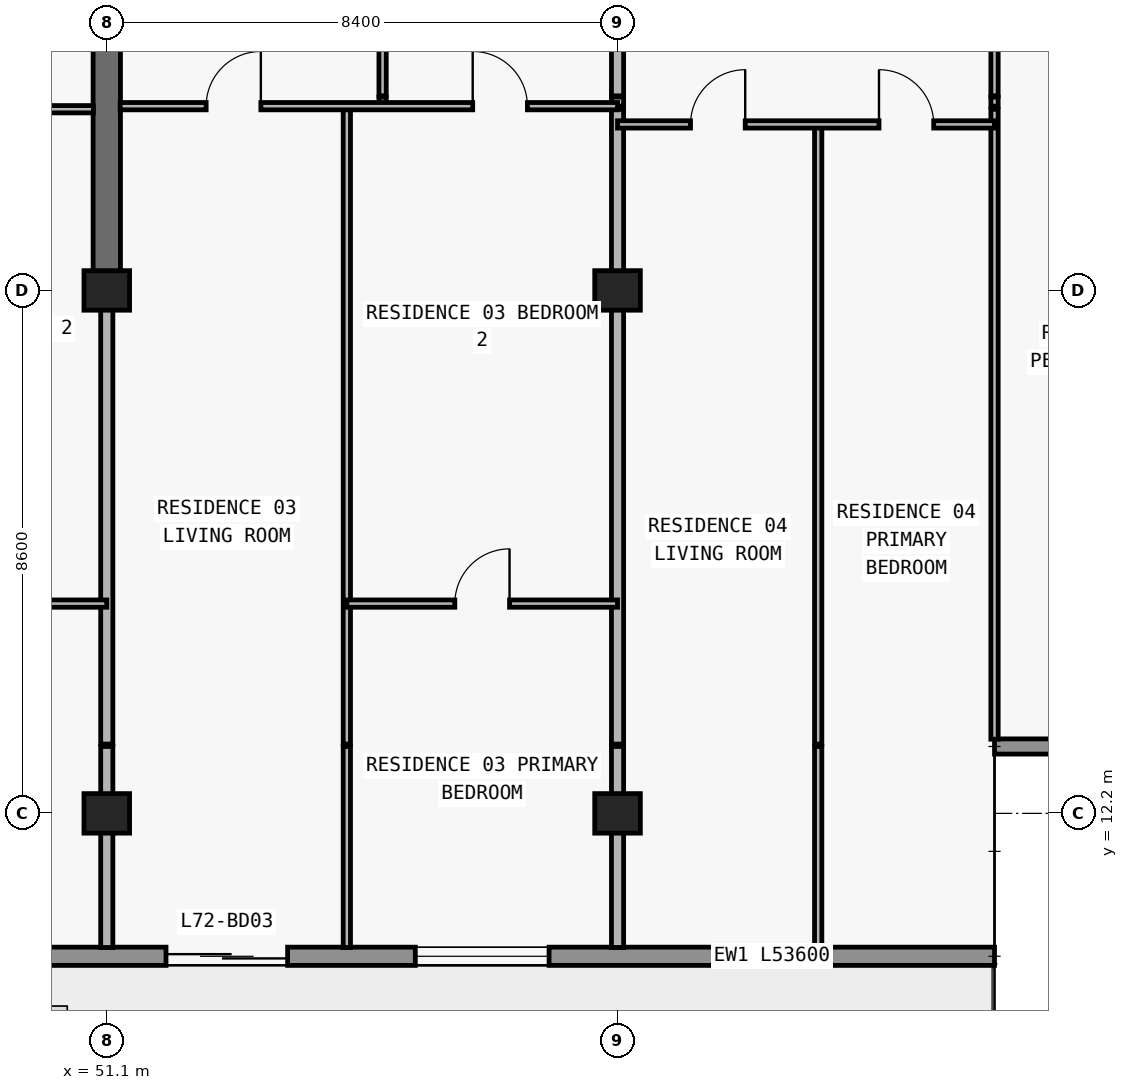
"""IFC4 building model, lengths in metres.
Left out: names, types, materials, properties, quantities, classifications, styles, units other than length and angle.
Written with IfcOpenShell. Run it as: python <this file> out.ifc"""

import sys

from ifc_helpers import new_model, si_unit, direction, frame, frame_2d, origin, origin_2d, place, context, subcontext, project, spatial, rectangle, extrude, element, fill, save


model = new_model("IFC4")
c1 = context("Model", 3, precision=1e-05, world=origin(), true_north=direction((0.0, 1.0)))
c2 = subcontext(c1, "Body", "Model", "MODEL_VIEW")
j1 = project(units=[si_unit("LENGTHUNIT", "METRE"), si_unit("PLANEANGLEUNIT", "RADIAN")], contexts=[c1])
p1 = place(None, origin())
s1 = spatial("IfcSite", under=j1, at=p1, CompositionType="ELEMENT")
p2 = place(p1, origin())
s2 = spatial("IfcBuilding", under=s1, at=p2, CompositionType="ELEMENT")
p3 = place(p2, frame((0.0, 0.0, 256.2)))
s3 = spatial("IfcBuildingStorey", under=s2, at=p3, CompositionType="ELEMENT", Elevation=256.2)
for number, where, z_axis, x_axis in (
    (1, (51.1, 12.2, 0.0), (0.0, 0.0, 1.0), (1.0, 0.0, 0.0)),
    (2, (59.5, 12.2, 0.0), (0.0, 0.0, 1.0), (1.0, 0.0, 0.0)),
    (3, (51.1, 20.8, 0.0), (0.0, 0.0, 1.0), (1.0, 0.0, 0.0)),
    (4, (59.5, 20.8, 0.0), (0.0, 0.0, 1.0), (1.0, 0.0, 0.0)),
):
    element("IfcColumn", number, at=place(p3, frame(where, z_axis=z_axis, x_axis=x_axis)), inside=s3, PredefinedType="COLUMN", context=c2, shape_type="SweptSolid", body=[
        extrude(rectangle(XDim=0.75, YDim=0.65, at=origin_2d()), origin(), (0.0, 0.0, 1.0), 3.05),
    ])
p4 = place(p3, frame((51.1, 20.8, 0.0), z_axis=(0.0, 0.0, 1.0), x_axis=(0.0, 1.0, 0.0)))
e5 = element("IfcWall", 5, at=p4, inside=s3, PredefinedType="SHEAR", context=c2, shape_type="SweptSolid", body=[
    extrude(rectangle(XDim=8.6, YDim=0.45, at=frame_2d((4.3, 0.0))), origin(), (0.0, 0.0, 1.0), 3.05),
])
p5 = place(p3, frame((65.7, 9.85, 0.0), z_axis=(0.0, 0.0, 1.0), x_axis=(-1.0, 0.0, 0.0)))
e6 = element("IfcWall", 6, at=p5, inside=s3, PredefinedType="STANDARD", context=c2, shape_type="SweptSolid", body=[
    extrude(rectangle(XDim=53.6, YDim=0.3, at=frame_2d((26.8, 0.0))), origin(), (0.0, 0.0, 1.0), 3.05),
])
p6 = place(p5, frame((49.5, 0.0, 0.0)))
e7 = element("IfcOpeningElement", 7, at=p6, cuts=e6, PredefinedType="OPENING", context=c2, shape_type="SweptSolid", body=[
    extrude(rectangle(XDim=2.0, YDim=2.3, at=frame_2d((1.0, 1.15))), frame((0.0, 0.16, 0.0), z_axis=(0.0, -1.0, 0.0), x_axis=(1.0, 0.0, 0.0)), (0.0, 0.0, 1.0), 0.32),
])
p7 = place(p5, frame((42.1, 0.0, 0.85)))
e8 = element("IfcOpeningElement", 8, at=p7, cuts=e6, PredefinedType="OPENING", context=c2, shape_type="SweptSolid", body=[
    extrude(rectangle(XDim=2.2, YDim=1.55, at=frame_2d((1.1, 0.775))), frame((0.0, 0.16, 0.0), z_axis=(0.0, -1.0, 0.0), x_axis=(1.0, 0.0, 0.0)), (0.0, 0.0, 1.0), 0.32),
])
p8 = place(p5, frame((36.09, 0.0, 0.0)))
e9 = element("IfcOpeningElement", 9, at=p8, cuts=e6, PredefinedType="OPENING", context=c2, shape_type="SweptSolid", body=[
    extrude(rectangle(XDim=2.0, YDim=2.3, at=frame_2d((1.0, 1.15))), frame((0.0, 0.16, 0.0), z_axis=(0.0, -1.0, 0.0), x_axis=(1.0, 0.0, 0.0)), (0.0, 0.0, 1.0), 0.32),
])
p9 = place(p5, frame((31.41, 0.0, 0.65)))
e10 = element("IfcOpeningElement", 10, at=p9, cuts=e6, PredefinedType="OPENING", context=c2, shape_type="SweptSolid", body=[
    extrude(rectangle(XDim=2.6, YDim=1.85, at=frame_2d((1.3, 0.925))), frame((0.0, 0.16, 0.0), z_axis=(0.0, -1.0, 0.0), x_axis=(1.0, 0.0, 0.0)), (0.0, 0.0, 1.0), 0.32),
])
p10 = place(p5, frame((25.7, 0.0, 0.85)))
e11 = element("IfcOpeningElement", 11, at=p10, cuts=e6, PredefinedType="OPENING", context=c2, shape_type="SweptSolid", body=[
    extrude(rectangle(XDim=2.2, YDim=1.55, at=frame_2d((1.1, 0.775))), frame((0.0, 0.16, 0.0), z_axis=(0.0, -1.0, 0.0), x_axis=(1.0, 0.0, 0.0)), (0.0, 0.0, 1.0), 0.32),
])
p11 = place(p5, frame((17.7, 0.0, 0.85)))
e12 = element("IfcOpeningElement", 12, at=p11, cuts=e6, PredefinedType="OPENING", context=c2, shape_type="SweptSolid", body=[
    extrude(rectangle(XDim=2.2, YDim=1.55, at=frame_2d((1.1, 0.775))), frame((0.0, 0.16, 0.0), z_axis=(0.0, -1.0, 0.0), x_axis=(1.0, 0.0, 0.0)), (0.0, 0.0, 1.0), 0.32),
])
p12 = place(p5, frame((11.626, 0.0, 0.0)))
e13 = element("IfcOpeningElement", 13, at=p12, cuts=e6, PredefinedType="OPENING", context=c2, shape_type="SweptSolid", body=[
    extrude(rectangle(XDim=2.0, YDim=2.3, at=frame_2d((1.0, 1.15))), frame((0.0, 0.16, 0.0), z_axis=(0.0, -1.0, 0.0), x_axis=(1.0, 0.0, 0.0)), (0.0, 0.0, 1.0), 0.32),
])
p13 = place(p5, frame((7.326, 0.0, 0.85)))
e14 = element("IfcOpeningElement", 14, at=p13, cuts=e6, PredefinedType="OPENING", context=c2, shape_type="SweptSolid", body=[
    extrude(rectangle(XDim=2.2, YDim=1.55, at=frame_2d((1.1, 0.775))), frame((0.0, 0.16, 0.0), z_axis=(0.0, -1.0, 0.0), x_axis=(1.0, 0.0, 0.0)), (0.0, 0.0, 1.0), 0.32),
])
p14 = place(p3, frame((65.7, 13.3, 0.0), z_axis=(0.0, 0.0, 1.0), x_axis=(1.0, 0.0, 0.0)))
e15 = element("IfcWall", 15, at=p14, inside=s3, PredefinedType="ELEMENTEDWALL", context=c2, shape_type="SweptSolid", body=[
    extrude(rectangle(XDim=3.85, YDim=0.25, at=frame_2d((1.925, 0.0))), origin(), (0.0, 0.0, 1.0), 3.05),
])
p15 = place(p3, frame((51.1, 9.995, 0.0), z_axis=(0.0, 0.0, 1.0), x_axis=(0.0, 1.0, 0.0)))
e16 = element("IfcWall", 16, at=p15, inside=s3, PredefinedType="PARTITIONING", context=c2, shape_type="SweptSolid", body=[
    extrude(rectangle(XDim=3.305, YDim=0.2, at=frame_2d((1.652, 0.0))), origin(), (0.0, 0.0, 1.0), 2.263),
])
p16 = place(p3, frame((51.1, 13.34, 0.0), z_axis=(0.0, 0.0, 1.0), x_axis=(0.0, 1.0, 0.0)))
e17 = element("IfcWall", 17, at=p16, inside=s3, PredefinedType="PARTITIONING", context=c2, shape_type="SweptSolid", body=[
    extrude(rectangle(XDim=7.455, YDim=0.2, at=frame_2d((3.728, 0.0))), origin(), (0.0, 0.0, 1.0), 2.263),
])
p17 = place(p3, frame((55.048, 9.995, 0.0), z_axis=(0.0, 0.0, 1.0), x_axis=(0.0, 1.0, 0.0)))
e18 = element("IfcWall", 18, at=p17, inside=s3, PredefinedType="PARTITIONING", context=c2, shape_type="SweptSolid", body=[
    extrude(rectangle(XDim=3.305, YDim=0.12, at=frame_2d((1.652, 0.0))), origin(), (0.0, 0.0, 1.0), 3.05),
])
p18 = place(p3, frame((55.048, 13.34, 0.0), z_axis=(0.0, 0.0, 1.0), x_axis=(0.0, 1.0, 0.0)))
e19 = element("IfcWall", 19, at=p18, inside=s3, PredefinedType="PARTITIONING", context=c2, shape_type="SweptSolid", body=[
    extrude(rectangle(XDim=10.44, YDim=0.12, at=frame_2d((5.22, 0.0))), origin(), (0.0, 0.0, 1.0), 3.05),
])
p19 = place(p3, frame((55.636, 23.83, 0.0), z_axis=(0.0, 0.0, 1.0), x_axis=(0.0, 1.0, 0.0)))
e20 = element("IfcWall", 20, at=p19, inside=s3, PredefinedType="PARTITIONING", context=c2, shape_type="SweptSolid", body=[
    extrude(rectangle(XDim=0.15, YDim=0.12, at=frame_2d((0.075, 0.0))), origin(), (0.0, 0.0, 1.0), 3.05),
])
p20 = place(p3, frame((55.636, 24.0, 0.0), z_axis=(0.0, 0.0, 1.0), x_axis=(0.0, 1.0, 0.0)))
e21 = element("IfcWall", 21, at=p20, inside=s3, PredefinedType="PARTITIONING", context=c2, shape_type="SweptSolid", body=[
    extrude(rectangle(XDim=4.58, YDim=0.12, at=frame_2d((2.29, 0.0))), origin(), (0.0, 0.0, 1.0), 3.05),
])
p21 = place(p20, frame((1.84, 0.0, 0.0)))
e22 = element("IfcOpeningElement", 22, at=p21, cuts=e21, PredefinedType="OPENING", context=c2, shape_type="SweptSolid", body=[
    extrude(rectangle(XDim=0.9, YDim=2.15, at=frame_2d((0.45, 1.075))), frame((0.0, 0.07, 0.0), z_axis=(0.0, -1.0, 0.0), x_axis=(1.0, 0.0, 0.0)), (0.0, 0.0, 1.0), 0.14),
])
p22 = place(p3, frame((59.5, 9.995, 0.0), z_axis=(0.0, 0.0, 1.0), x_axis=(0.0, 1.0, 0.0)))
e23 = element("IfcWall", 23, at=p22, inside=s3, PredefinedType="PARTITIONING", context=c2, shape_type="SweptSolid", body=[
    extrude(rectangle(XDim=3.305, YDim=0.2, at=frame_2d((1.652, 0.0))), origin(), (0.0, 0.0, 1.0), 2.263),
])
p23 = place(p3, frame((59.5, 13.34, 0.0), z_axis=(0.0, 0.0, 1.0), x_axis=(0.0, 1.0, 0.0)))
e24 = element("IfcWall", 24, at=p23, inside=s3, PredefinedType="PARTITIONING", context=c2, shape_type="SweptSolid", body=[
    extrude(rectangle(XDim=10.44, YDim=0.2, at=frame_2d((5.22, 0.0))), origin(), (0.0, 0.0, 1.0), 2.263),
])
p24 = place(p3, frame((59.5, 23.83, 0.0), z_axis=(0.0, 0.0, 1.0), x_axis=(0.0, 1.0, 0.0)))
e25 = element("IfcWall", 25, at=p24, inside=s3, PredefinedType="PARTITIONING", context=c2, shape_type="SweptSolid", body=[
    extrude(rectangle(XDim=0.15, YDim=0.2, at=frame_2d((0.075, 0.0))), origin(), (0.0, 0.0, 1.0), 2.263),
])
p25 = place(p3, frame((59.5, 24.0, 0.0), z_axis=(0.0, 0.0, 1.0), x_axis=(0.0, 1.0, 0.0)))
e26 = element("IfcWall", 26, at=p25, inside=s3, PredefinedType="PARTITIONING", context=c2, shape_type="SweptSolid", body=[
    extrude(rectangle(XDim=4.58, YDim=0.2, at=frame_2d((2.29, 0.0))), origin(), (0.0, 0.0, 1.0), 2.263),
])
p26 = place(p3, frame((62.8, 9.995, 0.0), z_axis=(0.0, 0.0, 1.0), x_axis=(0.0, 1.0, 0.0)))
e27 = element("IfcWall", 27, at=p26, inside=s3, PredefinedType="PARTITIONING", context=c2, shape_type="SweptSolid", body=[
    extrude(rectangle(XDim=3.305, YDim=0.12, at=frame_2d((1.652, 0.0))), origin(), (0.0, 0.0, 1.0), 3.05),
])
p27 = place(p3, frame((62.8, 13.34, 0.0), z_axis=(0.0, 0.0, 1.0), x_axis=(0.0, 1.0, 0.0)))
e28 = element("IfcWall", 28, at=p27, inside=s3, PredefinedType="PARTITIONING", context=c2, shape_type="SweptSolid", body=[
    extrude(rectangle(XDim=10.19, YDim=0.12, at=frame_2d((5.095, 0.0))), origin(), (0.0, 0.0, 1.0), 3.05),
])
p28 = place(p3, frame((65.7, 13.42, 0.0), z_axis=(0.0, 0.0, 1.0), x_axis=(0.0, 1.0, 0.0)))
e29 = element("IfcWall", 29, at=p28, inside=s3, PredefinedType="PARTITIONING", context=c2, shape_type="SweptSolid", body=[
    extrude(rectangle(XDim=10.36, YDim=0.12, at=frame_2d((5.18, 0.0))), origin(), (0.0, 0.0, 1.0), 3.05),
])
p29 = place(p3, frame((65.7, 23.83, 0.0), z_axis=(0.0, 0.0, 1.0), x_axis=(0.0, 1.0, 0.0)))
e30 = element("IfcWall", 30, at=p29, inside=s3, PredefinedType="PARTITIONING", context=c2, shape_type="SweptSolid", body=[
    extrude(rectangle(XDim=0.15, YDim=0.12, at=frame_2d((0.075, 0.0))), origin(), (0.0, 0.0, 1.0), 3.05),
])
p30 = place(p3, frame((65.7, 24.0, 0.0), z_axis=(0.0, 0.0, 1.0), x_axis=(0.0, 1.0, 0.0)))
e31 = element("IfcWall", 31, at=p30, inside=s3, PredefinedType="PARTITIONING", context=c2, shape_type="SweptSolid", body=[
    extrude(rectangle(XDim=4.58, YDim=0.12, at=frame_2d((2.29, 0.0))), origin(), (0.0, 0.0, 1.0), 3.05),
])
p31 = place(p30, frame((1.84, 0.0, 0.0)))
e32 = element("IfcOpeningElement", 32, at=p31, cuts=e31, PredefinedType="OPENING", context=c2, shape_type="SweptSolid", body=[
    extrude(rectangle(XDim=0.9, YDim=2.15, at=frame_2d((0.45, 1.075))), frame((0.0, 0.07, 0.0), z_axis=(0.0, -1.0, 0.0), x_axis=(1.0, 0.0, 0.0)), (0.0, 0.0, 1.0), 0.14),
])
p32 = place(p3, frame((35.1, 15.65, 0.0), z_axis=(0.0, 0.0, 1.0), x_axis=(1.0, 0.0, 0.0)))
e33 = element("IfcWall", 33, at=p32, inside=s3, PredefinedType="PARTITIONING", context=c2, shape_type="SweptSolid", body=[
    extrude(rectangle(XDim=16.0, YDim=0.12, at=frame_2d((8.0, 0.0))), origin(), (0.0, 0.0, 1.0), 3.05),
])
p33 = place(p32, frame((3.35, 0.0, 0.0)))
e34 = element("IfcOpeningElement", 34, at=p33, cuts=e33, PredefinedType="OPENING", context=c2, shape_type="SweptSolid", body=[
    extrude(rectangle(XDim=0.9, YDim=2.15, at=frame_2d((0.45, 1.075))), frame((0.0, 0.07, 0.0), z_axis=(0.0, -1.0, 0.0), x_axis=(1.0, 0.0, 0.0)), (0.0, 0.0, 1.0), 0.14),
])
p34 = place(p32, frame((11.35, 0.0, 0.0)))
e35 = element("IfcOpeningElement", 35, at=p34, cuts=e33, PredefinedType="OPENING", context=c2, shape_type="SweptSolid", body=[
    extrude(rectangle(XDim=0.9, YDim=2.15, at=frame_2d((0.45, 1.075))), frame((0.0, 0.07, 0.0), z_axis=(0.0, -1.0, 0.0), x_axis=(1.0, 0.0, 0.0)), (0.0, 0.0, 1.0), 0.14),
])
p35 = place(p3, frame((55.048, 15.65, 0.0), z_axis=(0.0, 0.0, 1.0), x_axis=(1.0, 0.0, 0.0)))
e36 = element("IfcWall", 36, at=p35, inside=s3, PredefinedType="PARTITIONING", context=c2, shape_type="SweptSolid", body=[
    extrude(rectangle(XDim=4.452, YDim=0.12, at=frame_2d((2.226, 0.0))), origin(), (0.0, 0.0, 1.0), 3.05),
])
p36 = place(p35, frame((1.776, 0.0, 0.0)))
e37 = element("IfcOpeningElement", 37, at=p36, cuts=e36, PredefinedType="OPENING", context=c2, shape_type="SweptSolid", body=[
    extrude(rectangle(XDim=0.9, YDim=2.15, at=frame_2d((0.45, 1.075))), frame((0.0, 0.07, 0.0), z_axis=(0.0, -1.0, 0.0), x_axis=(1.0, 0.0, 0.0)), (0.0, 0.0, 1.0), 0.14),
])
p37 = place(p3, frame((59.5, 23.53, 0.0), z_axis=(0.0, 0.0, 1.0), x_axis=(1.0, 0.0, 0.0)))
e38 = element("IfcWall", 38, at=p37, inside=s3, PredefinedType="PARTITIONING", context=c2, shape_type="SweptSolid", body=[
    extrude(rectangle(XDim=6.2, YDim=0.12, at=frame_2d((3.1, 0.0))), origin(), (0.0, 0.0, 1.0), 3.05),
])
p38 = place(p37, frame((1.2, 0.0, 0.0)))
e39 = element("IfcOpeningElement", 39, at=p38, cuts=e38, PredefinedType="OPENING", context=c2, shape_type="SweptSolid", body=[
    extrude(rectangle(XDim=0.9, YDim=2.15, at=frame_2d((0.45, 1.075))), frame((0.0, 0.07, 0.0), z_axis=(0.0, -1.0, 0.0), x_axis=(1.0, 0.0, 0.0)), (0.0, 0.0, 1.0), 0.14),
])
p39 = place(p37, frame((4.3, 0.0, 0.0)))
e40 = element("IfcOpeningElement", 40, at=p39, cuts=e38, PredefinedType="OPENING", context=c2, shape_type="SweptSolid", body=[
    extrude(rectangle(XDim=0.9, YDim=2.15, at=frame_2d((0.45, 1.075))), frame((0.0, 0.07, 0.0), z_axis=(0.0, -1.0, 0.0), x_axis=(1.0, 0.0, 0.0)), (0.0, 0.0, 1.0), 0.14),
])
p40 = place(p3, frame((42.7, 23.78, 0.0), z_axis=(0.0, 0.0, 1.0), x_axis=(1.0, 0.0, 0.0)))
e41 = element("IfcWall", 41, at=p40, inside=s3, PredefinedType="PARTITIONING", context=c2, shape_type="SweptSolid", body=[
    extrude(rectangle(XDim=8.18, YDim=0.12, at=frame_2d((4.09, 0.0))), origin(), (0.0, 0.0, 1.0), 3.05),
])
p41 = place(p40, frame((3.64, 0.0, 0.0)))
e42 = element("IfcOpeningElement", 42, at=p41, cuts=e41, PredefinedType="OPENING", context=c2, shape_type="SweptSolid", body=[
    extrude(rectangle(XDim=0.9, YDim=2.15, at=frame_2d((0.45, 1.075))), frame((0.0, 0.07, 0.0), z_axis=(0.0, -1.0, 0.0), x_axis=(1.0, 0.0, 0.0)), (0.0, 0.0, 1.0), 0.14),
])
p42 = place(p3, frame((51.32, 23.83, 0.0), z_axis=(0.0, 0.0, 1.0), x_axis=(1.0, 0.0, 0.0)))
e43 = element("IfcWall", 43, at=p42, inside=s3, PredefinedType="PARTITIONING", context=c2, shape_type="SweptSolid", body=[
    extrude(rectangle(XDim=8.18, YDim=0.12, at=frame_2d((4.09, 0.0))), origin(), (0.0, 0.0, 1.0), 3.05),
])
p43 = place(p42, frame((1.414, 0.0, 0.0)))
e44 = element("IfcOpeningElement", 44, at=p43, cuts=e43, PredefinedType="OPENING", context=c2, shape_type="SweptSolid", body=[
    extrude(rectangle(XDim=0.9, YDim=2.15, at=frame_2d((0.45, 1.075))), frame((0.0, 0.07, 0.0), z_axis=(0.0, -1.0, 0.0), x_axis=(1.0, 0.0, 0.0)), (0.0, 0.0, 1.0), 0.14),
])
p44 = place(p42, frame((5.798, 0.0, 0.0)))
e45 = element("IfcOpeningElement", 45, at=p44, cuts=e43, PredefinedType="OPENING", context=c2, shape_type="SweptSolid", body=[
    extrude(rectangle(XDim=0.9, YDim=2.15, at=frame_2d((0.45, 1.075))), frame((0.0, 0.07, 0.0), z_axis=(0.0, -1.0, 0.0), x_axis=(1.0, 0.0, 0.0)), (0.0, 0.0, 1.0), 0.14),
])
p45 = place(p12, origin())
e46 = element("IfcDoor", 46, at=p45, inside=s3, OperationType="DOUBLE_DOOR_SLIDING", PredefinedType="DOOR", context=c2, shape_type="SweptSolid", body=[
    extrude(rectangle(XDim=2.0, YDim=2.3, at=frame_2d((1.0, 1.15))), frame((0.0, 0.025, 0.0), z_axis=(0.0, -1.0, 0.0), x_axis=(1.0, 0.0, 0.0)), (0.0, 0.0, 1.0), 0.05),
])
fill(e13, e46)
p46 = place(p13, origin())
e47 = element("IfcWindow", 47, at=p46, inside=s3, PartitioningType="SINGLE_PANEL", PredefinedType="WINDOW", context=c2, shape_type="SweptSolid", body=[
    extrude(rectangle(XDim=2.2, YDim=1.55, at=frame_2d((1.1, 0.775))), frame((0.0, 0.03, 0.0), z_axis=(0.0, -1.0, 0.0), x_axis=(1.0, 0.0, 0.0)), (0.0, 0.0, 1.0), 0.06),
])
fill(e14, e47)
p47 = place(p43, origin())
e48 = element("IfcDoor", 48, at=p47, inside=s3, OperationType="SINGLE_SWING_RIGHT", PredefinedType="DOOR", context=c2, shape_type="SweptSolid", body=[
    extrude(rectangle(XDim=0.9, YDim=2.15, at=frame_2d((0.45, 1.075))), frame((0.0, 0.025, 0.0), z_axis=(0.0, -1.0, 0.0), x_axis=(1.0, 0.0, 0.0)), (0.0, 0.0, 1.0), 0.05),
])
fill(e44, e48)
p48 = place(p44, origin())
e49 = element("IfcDoor", 49, at=p48, inside=s3, OperationType="SINGLE_SWING_LEFT", PredefinedType="DOOR", context=c2, shape_type="SweptSolid", body=[
    extrude(rectangle(XDim=0.9, YDim=2.15, at=frame_2d((0.45, 1.075))), frame((0.0, 0.025, 0.0), z_axis=(0.0, -1.0, 0.0), x_axis=(1.0, 0.0, 0.0)), (0.0, 0.0, 1.0), 0.05),
])
fill(e45, e49)
p49 = place(p36, origin())
e50 = element("IfcDoor", 50, at=p49, inside=s3, OperationType="SINGLE_SWING_RIGHT", PredefinedType="DOOR", context=c2, shape_type="SweptSolid", body=[
    extrude(rectangle(XDim=0.9, YDim=2.15, at=frame_2d((0.45, 1.075))), frame((0.0, 0.025, 0.0), z_axis=(0.0, -1.0, 0.0), x_axis=(1.0, 0.0, 0.0)), (0.0, 0.0, 1.0), 0.05),
])
fill(e37, e50)
p50 = place(p38, origin())
e51 = element("IfcDoor", 51, at=p50, inside=s3, OperationType="SINGLE_SWING_RIGHT", PredefinedType="DOOR", context=c2, shape_type="SweptSolid", body=[
    extrude(rectangle(XDim=0.9, YDim=2.15, at=frame_2d((0.45, 1.075))), frame((0.0, 0.025, 0.0), z_axis=(0.0, -1.0, 0.0), x_axis=(1.0, 0.0, 0.0)), (0.0, 0.0, 1.0), 0.05),
])
fill(e39, e51)
p51 = place(p39, origin())
e52 = element("IfcDoor", 52, at=p51, inside=s3, OperationType="SINGLE_SWING_LEFT", PredefinedType="DOOR", context=c2, shape_type="SweptSolid", body=[
    extrude(rectangle(XDim=0.9, YDim=2.15, at=frame_2d((0.45, 1.075))), frame((0.0, 0.025, 0.0), z_axis=(0.0, -1.0, 0.0), x_axis=(1.0, 0.0, 0.0)), (0.0, 0.0, 1.0), 0.05),
])
fill(e40, e52)
save(model, sys.argv[1])
